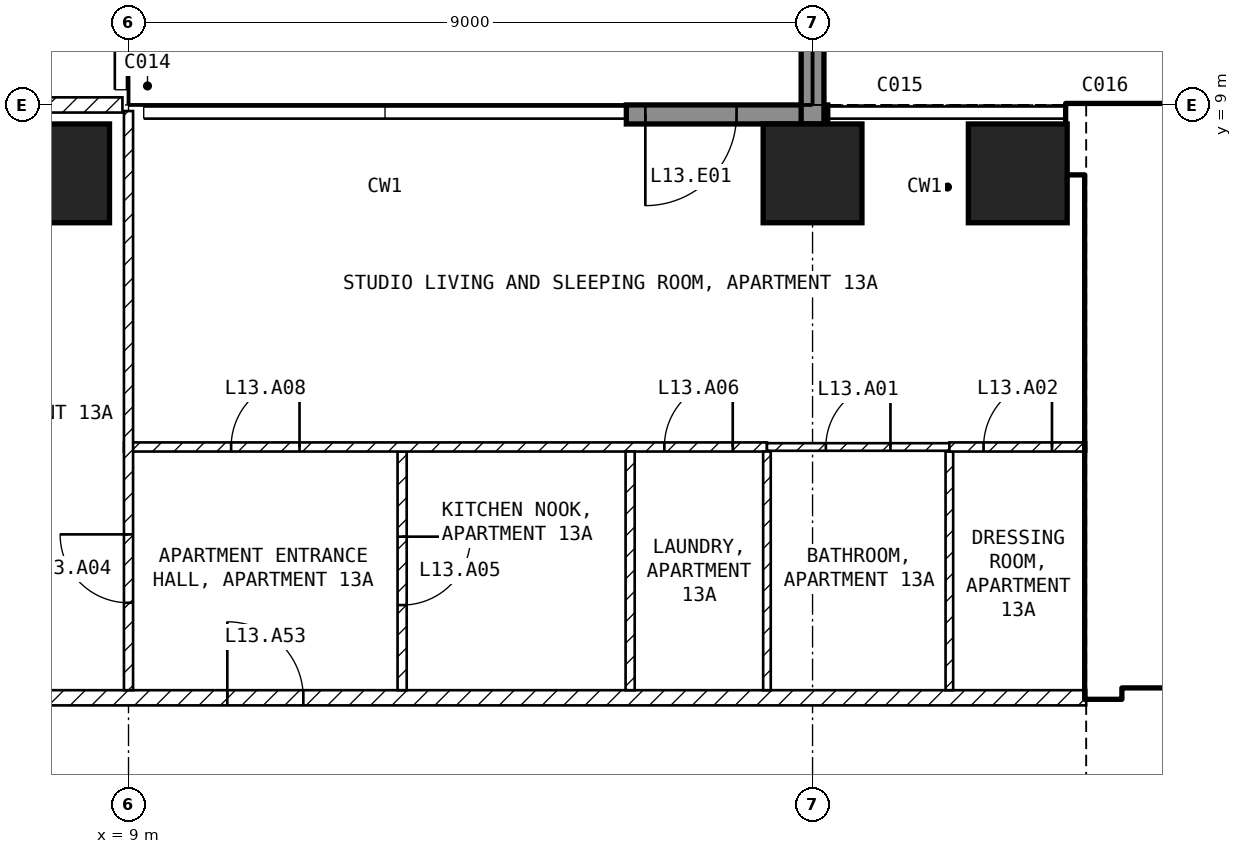
"""IFC4 building model, lengths in metres.
Left out: names, types, materials, properties, quantities, classifications, styles, units other than length and angle.
Written with IfcOpenShell. Run it as: python <this file> out.ifc"""

import sys

from ifc_helpers import new_model, si_unit, direction, frame, frame_2d, origin, origin_2d, place, context, subcontext, project, spatial, rectangle, extrude, element, fill, save


model = new_model("IFC4")
c1 = context("Model", 3, precision=1e-05, world=origin(), true_north=direction((0.0, 1.0)))
c2 = subcontext(c1, "Body", "Model", "MODEL_VIEW")
j1 = project(units=[si_unit("LENGTHUNIT", "METRE"), si_unit("PLANEANGLEUNIT", "RADIAN")], contexts=[c1])
p1 = place(None, origin())
s1 = spatial("IfcSite", under=j1, at=p1, CompositionType="ELEMENT")
p2 = place(p1, origin())
s2 = spatial("IfcBuilding", under=s1, at=p2, CompositionType="ELEMENT")
p3 = place(p2, frame((0.0, 0.0, 64.5)))
s3 = spatial("IfcBuildingStorey", under=s2, at=p3, CompositionType="ELEMENT", Elevation=64.5)
for number, where, z_axis, x_axis in (
    (1, (8.1, 8.1, -0.25), (0.0, 0.0, 1.0), (1.0, 0.0, 0.0)),
    (2, (18.0, 8.1, -0.25), (0.0, 0.0, 1.0), (1.0, 0.0, 0.0)),
    (3, (20.7, 8.1, -0.25), (0.0, 0.0, 1.0), (1.0, 0.0, 0.0)),
):
    element("IfcColumn", number, at=place(p3, frame(where, z_axis=z_axis, x_axis=x_axis)), inside=s3, PredefinedType="COLUMN", context=c2, shape_type="SweptSolid", body=[
        extrude(rectangle(XDim=1.3, YDim=1.3, at=origin_2d()), origin(), (0.0, 0.0, 1.0), 3.5),
    ])
p4 = place(p3, frame((18.2, 8.875, 0.0), z_axis=(0.0, 0.0, 1.0), x_axis=(-1.0, 0.0, 0.0)))
e4 = element("IfcWall", 4, at=p4, inside=s3, PredefinedType="SOLIDWALL", context=c2, shape_type="SweptSolid", body=[
    extrude(rectangle(XDim=2.65, YDim=0.25, at=frame_2d((1.325, 0.0))), origin(), (0.0, 0.0, 1.0), 3.25),
])
p5 = place(p4, frame((1.2, 0.0, 0.0)))
e5 = element("IfcOpeningElement", 5, at=p5, cuts=e4, PredefinedType="OPENING", context=c2, shape_type="SweptSolid", body=[
    extrude(rectangle(XDim=1.2, YDim=2.4, at=frame_2d((0.6, 1.2))), frame((0.0, 0.135, 0.0), z_axis=(0.0, -1.0, 0.0), x_axis=(1.0, 0.0, 0.0)), (0.0, 0.0, 1.0), 0.27),
])
p6 = place(p3, frame((18.0, 8.75, 0.0), z_axis=(0.0, 0.0, 1.0), x_axis=(0.0, 1.0, 0.0)))
e6 = element("IfcWall", 6, at=p6, inside=s3, PredefinedType="SOLIDWALL", context=c2, shape_type="SweptSolid", body=[
    extrude(rectangle(XDim=2.95, YDim=0.3, at=frame_2d((1.475, 0.0))), origin(), (0.0, 0.0, 1.0), 3.25),
])
p7 = place(p3, frame((21.35, 8.55, 0.0), z_axis=(0.0, 0.0, 1.0), x_axis=(1.0, 0.0, 0.0)))
e7 = element("IfcWall", 7, at=p7, inside=s3, PredefinedType="SHEAR", context=c2, shape_type="SweptSolid", body=[
    extrude(rectangle(XDim=10.15, YDim=0.9, at=frame_2d((5.075, 0.0))), origin(), (0.0, 0.0, 1.0), 3.25),
])
p8 = place(p3, frame((21.825, 1.2, 0.0), z_axis=(0.0, 0.0, 1.0), x_axis=(0.0, 1.0, 0.0)))
e8 = element("IfcWall", 8, at=p8, inside=s3, PredefinedType="SHEAR", context=c2, shape_type="SweptSolid", body=[
    extrude(rectangle(XDim=6.9, YDim=0.45, at=frame_2d((3.45, 0.0))), origin(), (0.0, 0.0, 1.0), 3.25),
])
p9 = place(p3, frame((22.05, 1.45, 0.0), z_axis=(0.0, 0.0, 1.0), x_axis=(1.0, 0.0, 0.0)))
e9 = element("IfcWall", 9, at=p9, inside=s3, PredefinedType="SOLIDWALL", context=c2, shape_type="SweptSolid", body=[
    extrude(rectangle(XDim=13.05, YDim=0.2, at=frame_2d((6.525, 0.0))), origin(), (0.0, 0.0, 1.0), 3.25),
])
p10 = place(p9, frame((0.75, 0.0, 0.0)))
e10 = element("IfcOpeningElement", 10, at=p10, cuts=e9, PredefinedType="OPENING", context=c2, shape_type="SweptSolid", body=[
    extrude(rectangle(XDim=1.0, YDim=2.1, at=frame_2d((0.5, 1.05))), frame((0.0, 0.11, 0.0), z_axis=(0.0, -1.0, 0.0), x_axis=(1.0, 0.0, 0.0)), (0.0, 0.0, 1.0), 0.22),
])
p11 = place(p9, frame((3.25, 0.0, 0.0)))
e11 = element("IfcOpeningElement", 11, at=p11, cuts=e9, PredefinedType="OPENING", context=c2, shape_type="SweptSolid", body=[
    extrude(rectangle(XDim=1.0, YDim=2.1, at=frame_2d((0.5, 1.05))), frame((0.0, 0.11, 0.0), z_axis=(0.0, -1.0, 0.0), x_axis=(1.0, 0.0, 0.0)), (0.0, 0.0, 1.0), 0.22),
])
p12 = place(p3, frame((22.05, 5.15, 0.0), z_axis=(0.0, 0.0, 1.0), x_axis=(1.0, 0.0, 0.0)))
e12 = element("IfcWall", 12, at=p12, inside=s3, PredefinedType="SOLIDWALL", context=c2, shape_type="SweptSolid", body=[
    extrude(rectangle(XDim=6.3, YDim=0.2, at=frame_2d((3.15, 0.0))), origin(), (0.0, 0.0, 1.0), 3.25),
])
p13 = place(p12, frame((0.2, 0.0, 0.0)))
e13 = element("IfcOpeningElement", 13, at=p13, cuts=e12, PredefinedType="OPENING", context=c2, shape_type="SweptSolid", body=[
    extrude(rectangle(XDim=1.0, YDim=2.1, at=frame_2d((0.5, 1.05))), frame((0.0, 0.11, 0.0), z_axis=(0.0, -1.0, 0.0), x_axis=(1.0, 0.0, 0.0)), (0.0, 0.0, 1.0), 0.22),
])
p14 = place(p3, frame((1.1, 1.2, 0.0), z_axis=(0.0, 0.0, 1.0), x_axis=(1.0, 0.0, 0.0)))
e14 = element("IfcWall", 14, at=p14, inside=s3, PredefinedType="PARTITIONING", context=c2, shape_type="SweptSolid", body=[
    extrude(rectangle(XDim=20.5, YDim=0.2, at=frame_2d((10.25, 0.0))), origin(), (0.0, 0.0, 1.0), 3.25),
])
p15 = place(p14, frame((9.2, 0.0, 0.0)))
e15 = element("IfcOpeningElement", 15, at=p15, cuts=e14, PredefinedType="OPENING", context=c2, shape_type="SweptSolid", body=[
    extrude(rectangle(XDim=1.0, YDim=2.1, at=frame_2d((0.5, 1.05))), frame((0.0, 0.11, 0.0), z_axis=(0.0, -1.0, 0.0), x_axis=(1.0, 0.0, 0.0)), (0.0, 0.0, 1.0), 0.22),
])
p16 = place(p3, frame((-8.92, 9.0, 0.0), z_axis=(0.0, 0.0, 1.0), x_axis=(1.0, 0.0, 0.0)))
e16 = element("IfcWall", 16, at=p16, inside=s3, PredefinedType="PARTITIONING", context=c2, shape_type="SweptSolid", body=[
    extrude(rectangle(XDim=17.84, YDim=0.2, at=frame_2d((8.92, 0.0))), origin(), (0.0, 0.0, 1.0), 3.25),
])
p17 = place(p16, frame((8.42, 0.0, 0.0)))
e17 = element("IfcOpeningElement", 17, at=p17, cuts=e16, PredefinedType="OPENING", context=c2, shape_type="SweptSolid", body=[
    extrude(rectangle(XDim=1.0, YDim=2.1, at=frame_2d((0.5, 1.05))), frame((0.0, 0.11, 0.0), z_axis=(0.0, -1.0, 0.0), x_axis=(1.0, 0.0, 0.0)), (0.0, 0.0, 1.0), 0.22),
])
p18 = place(p3, frame((12.6, 4.44, 0.0), z_axis=(0.0, 0.0, 1.0), x_axis=(0.0, -1.0, 0.0)))
e18 = element("IfcWall", 18, at=p18, inside=s3, PredefinedType="PARTITIONING", context=c2, shape_type="SweptSolid", body=[
    extrude(rectangle(XDim=3.14, YDim=0.12, at=frame_2d((1.57, 0.0))), origin(), (0.0, 0.0, 1.0), 3.25),
])
p19 = place(p18, frame((1.12, 0.0, 0.0)))
e19 = element("IfcOpeningElement", 19, at=p19, cuts=e18, PredefinedType="OPENING", context=c2, shape_type="SweptSolid", body=[
    extrude(rectangle(XDim=0.9, YDim=2.1, at=frame_2d((0.45, 1.05))), frame((0.0, 0.07, 0.0), z_axis=(0.0, -1.0, 0.0), x_axis=(1.0, 0.0, 0.0)), (0.0, 0.0, 1.0), 0.14),
])
p20 = place(p3, frame((8.94, 4.5, 0.0), z_axis=(0.0, 0.0, 1.0), x_axis=(1.0, 0.0, 0.0)))
e20 = element("IfcWall", 20, at=p20, inside=s3, PredefinedType="PARTITIONING", context=c2, shape_type="SweptSolid", body=[
    extrude(rectangle(XDim=8.46, YDim=0.12, at=frame_2d((4.23, 0.0))), origin(), (0.0, 0.0, 1.0), 3.25),
])
p21 = place(p20, frame((7.11, 0.0, 0.0)))
e21 = element("IfcOpeningElement", 21, at=p21, cuts=e20, PredefinedType="OPENING", context=c2, shape_type="SweptSolid", body=[
    extrude(rectangle(XDim=0.9, YDim=2.1, at=frame_2d((0.45, 1.05))), frame((0.0, 0.07, 0.0), z_axis=(0.0, -1.0, 0.0), x_axis=(1.0, 0.0, 0.0)), (0.0, 0.0, 1.0), 0.14),
])
p22 = place(p20, frame((1.41, 0.0, 0.0)))
e22 = element("IfcOpeningElement", 22, at=p22, cuts=e20, PredefinedType="OPENING", context=c2, shape_type="SweptSolid", body=[
    extrude(rectangle(XDim=0.9, YDim=2.1, at=frame_2d((0.45, 1.05))), frame((0.0, 0.07, 0.0), z_axis=(0.0, -1.0, 0.0), x_axis=(1.0, 0.0, 0.0)), (0.0, 0.0, 1.0), 0.14),
])
p23 = place(p3, frame((9.0, 1.3, 0.0), z_axis=(0.0, 0.0, 1.0), x_axis=(0.0, 1.0, 0.0)))
e23 = element("IfcWall", 23, at=p23, inside=s3, PredefinedType="PARTITIONING", context=c2, shape_type="SweptSolid", body=[
    extrude(rectangle(XDim=7.62, YDim=0.12, at=frame_2d((3.81, 0.0))), origin(), (0.0, 0.0, 1.0), 3.25),
])
p24 = place(p23, frame((1.15, 0.0, 0.0)))
e24 = element("IfcOpeningElement", 24, at=p24, cuts=e23, PredefinedType="OPENING", context=c2, shape_type="SweptSolid", body=[
    extrude(rectangle(XDim=0.9, YDim=2.1, at=frame_2d((0.45, 1.05))), frame((0.0, 0.07, 0.0), z_axis=(0.0, -1.0, 0.0), x_axis=(1.0, 0.0, 0.0)), (0.0, 0.0, 1.0), 0.14),
])
p25 = place(p3, frame((15.6, 4.44, 0.0), z_axis=(0.0, 0.0, 1.0), x_axis=(0.0, -1.0, 0.0)))
e25 = element("IfcWall", 25, at=p25, inside=s3, PredefinedType="PARTITIONING", context=c2, shape_type="SweptSolid", body=[
    extrude(rectangle(XDim=3.14, YDim=0.12, at=frame_2d((1.57, 0.0))), origin(), (0.0, 0.0, 1.0), 3.25),
])
for number, where, z_axis, x_axis in (
    (26, (17.4, 4.44, 0.0), (0.0, 0.0, 1.0), (0.0, -1.0, 0.0)),
    (27, (19.8, 4.44, 0.0), (0.0, 0.0, 1.0), (0.0, -1.0, 0.0)),
):
    element("IfcWall", number, at=place(p3, frame(where, z_axis=z_axis, x_axis=x_axis)), inside=s3, PredefinedType="PARTITIONING", context=c2, shape_type="SweptSolid", body=[
        extrude(rectangle(XDim=3.14, YDim=0.1, at=frame_2d((1.57, 0.0))), origin(), (0.0, 0.0, 1.0), 3.25),
    ])
p26 = place(p3, frame((17.4, 4.5, 0.0), z_axis=(0.0, 0.0, 1.0), x_axis=(1.0, 0.0, 0.0)))
e28 = element("IfcWall", 28, at=p26, inside=s3, PredefinedType="PARTITIONING", context=c2, shape_type="SweptSolid", body=[
    extrude(rectangle(XDim=2.4, YDim=0.1, at=frame_2d((1.2, 0.0))), origin(), (0.0, 0.0, 1.0), 3.25),
])
p27 = place(p26, frame((0.775, 0.0, 0.0)))
e29 = element("IfcOpeningElement", 29, at=p27, cuts=e28, PredefinedType="OPENING", context=c2, shape_type="SweptSolid", body=[
    extrude(rectangle(XDim=0.85, YDim=2.1, at=frame_2d((0.425, 1.05))), frame((0.0, 0.06, 0.0), z_axis=(0.0, -1.0, 0.0), x_axis=(1.0, 0.0, 0.0)), (0.0, 0.0, 1.0), 0.12),
])
p28 = place(p3, frame((19.8, 4.5, 0.0), z_axis=(0.0, 0.0, 1.0), x_axis=(1.0, 0.0, 0.0)))
e30 = element("IfcWall", 30, at=p28, inside=s3, PredefinedType="PARTITIONING", context=c2, shape_type="SweptSolid", body=[
    extrude(rectangle(XDim=1.8, YDim=0.12, at=frame_2d((0.9, 0.0))), origin(), (0.0, 0.0, 1.0), 3.25),
])
p29 = place(p28, frame((0.45, 0.0, 0.0)))
e31 = element("IfcOpeningElement", 31, at=p29, cuts=e30, PredefinedType="OPENING", context=c2, shape_type="SweptSolid", body=[
    extrude(rectangle(XDim=0.9, YDim=2.1, at=frame_2d((0.45, 1.05))), frame((0.0, 0.07, 0.0), z_axis=(0.0, -1.0, 0.0), x_axis=(1.0, 0.0, 0.0)), (0.0, 0.0, 1.0), 0.14),
])
p30 = place(p5, origin())
e32 = element("IfcDoor", 32, at=p30, inside=s3, OperationType="SINGLE_SWING_RIGHT", PredefinedType="DOOR", context=c2, shape_type="SweptSolid", body=[
    extrude(rectangle(XDim=1.2, YDim=2.4, at=frame_2d((0.6, 1.2))), frame((0.0, 0.025, 0.0), z_axis=(0.0, -1.0, 0.0), x_axis=(1.0, 0.0, 0.0)), (0.0, 0.0, 1.0), 0.05),
])
fill(e5, e32)
p31 = place(p13, origin())
e33 = element("IfcDoor", 33, at=p31, inside=s3, OperationType="SINGLE_SWING_LEFT", PredefinedType="DOOR", context=c2, shape_type="SweptSolid", body=[
    extrude(rectangle(XDim=1.0, YDim=2.1, at=frame_2d((0.5, 1.05))), frame((0.0, 0.025, 0.0), z_axis=(0.0, -1.0, 0.0), x_axis=(1.0, 0.0, 0.0)), (0.0, 0.0, 1.0), 0.05),
])
fill(e13, e33)
p32 = place(p27, origin())
e34 = element("IfcDoor", 34, at=p32, inside=s3, OperationType="SINGLE_SWING_RIGHT", PredefinedType="DOOR", context=c2, shape_type="SweptSolid", body=[
    extrude(rectangle(XDim=0.85, YDim=2.1, at=frame_2d((0.425, 1.05))), frame((0.0, 0.025, 0.0), z_axis=(0.0, -1.0, 0.0), x_axis=(1.0, 0.0, 0.0)), (0.0, 0.0, 1.0), 0.05),
])
fill(e29, e34)
p33 = place(p29, origin())
e35 = element("IfcDoor", 35, at=p33, inside=s3, OperationType="SINGLE_SWING_RIGHT", PredefinedType="DOOR", context=c2, shape_type="SweptSolid", body=[
    extrude(rectangle(XDim=0.9, YDim=2.1, at=frame_2d((0.45, 1.05))), frame((0.0, 0.025, 0.0), z_axis=(0.0, -1.0, 0.0), x_axis=(1.0, 0.0, 0.0)), (0.0, 0.0, 1.0), 0.05),
])
fill(e31, e35)
p34 = place(p24, origin())
e36 = element("IfcDoor", 36, at=p34, inside=s3, OperationType="SINGLE_SWING_RIGHT", PredefinedType="DOOR", context=c2, shape_type="SweptSolid", body=[
    extrude(rectangle(XDim=0.9, YDim=2.1, at=frame_2d((0.45, 1.05))), frame((0.0, 0.025, 0.0), z_axis=(0.0, -1.0, 0.0), x_axis=(1.0, 0.0, 0.0)), (0.0, 0.0, 1.0), 0.05),
])
fill(e24, e36)
p35 = place(p19, origin())
e37 = element("IfcDoor", 37, at=p35, inside=s3, OperationType="SINGLE_SWING_LEFT", PredefinedType="DOOR", context=c2, shape_type="SweptSolid", body=[
    extrude(rectangle(XDim=0.9, YDim=2.1, at=frame_2d((0.45, 1.05))), frame((0.0, 0.025, 0.0), z_axis=(0.0, -1.0, 0.0), x_axis=(1.0, 0.0, 0.0)), (0.0, 0.0, 1.0), 0.05),
])
fill(e19, e37)
p36 = place(p21, origin())
e38 = element("IfcDoor", 38, at=p36, inside=s3, OperationType="SINGLE_SWING_RIGHT", PredefinedType="DOOR", context=c2, shape_type="SweptSolid", body=[
    extrude(rectangle(XDim=0.9, YDim=2.1, at=frame_2d((0.45, 1.05))), frame((0.0, 0.025, 0.0), z_axis=(0.0, -1.0, 0.0), x_axis=(1.0, 0.0, 0.0)), (0.0, 0.0, 1.0), 0.05),
])
fill(e21, e38)
p37 = place(p22, origin())
e39 = element("IfcDoor", 39, at=p37, inside=s3, OperationType="SINGLE_SWING_RIGHT", PredefinedType="DOOR", context=c2, shape_type="SweptSolid", body=[
    extrude(rectangle(XDim=0.9, YDim=2.1, at=frame_2d((0.45, 1.05))), frame((0.0, 0.025, 0.0), z_axis=(0.0, -1.0, 0.0), x_axis=(1.0, 0.0, 0.0)), (0.0, 0.0, 1.0), 0.05),
])
fill(e22, e39)
p38 = place(p15, origin())
e40 = element("IfcDoor", 40, at=p38, inside=s3, OperationType="SINGLE_SWING_LEFT", PredefinedType="DOOR", context=c2, shape_type="SweptSolid", body=[
    extrude(rectangle(XDim=1.0, YDim=2.1, at=frame_2d((0.5, 1.05))), frame((0.0, 0.025, 0.0), z_axis=(0.0, -1.0, 0.0), x_axis=(1.0, 0.0, 0.0)), (0.0, 0.0, 1.0), 0.05),
])
fill(e15, e40)
save(model, sys.argv[1])
